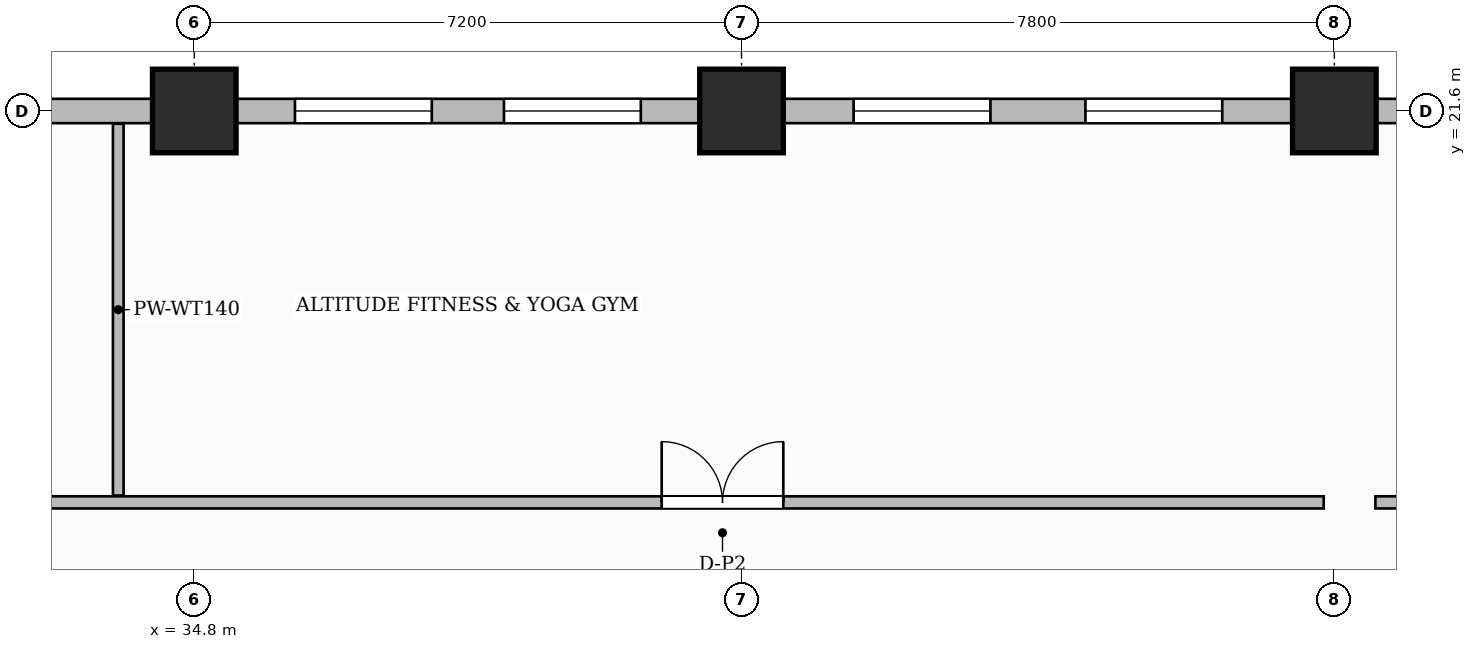
"""IFC4 building model, lengths in metres.
Left out: names, types, materials, properties, quantities, classifications, styles, units other than length and angle.
Written with IfcOpenShell. Run it as: python <this file> out.ifc"""

import sys

from ifc_helpers import new_model, si_unit, direction, frame, frame_2d, origin, origin_2d, place, context, subcontext, project, spatial, rectangle, extrude, source, transform, mapped, element, fill, save


model = new_model("IFC4")
c1 = context("Model", 3, precision=1e-05, world=origin(), true_north=direction((0.0, 1.0)))
c2 = subcontext(c1, "Body", "Model", "MODEL_VIEW")
j1 = project(units=[si_unit("LENGTHUNIT", "METRE"), si_unit("PLANEANGLEUNIT", "RADIAN")], contexts=[c1])
p1 = place(None, origin())
s1 = spatial("IfcSite", under=j1, at=p1, CompositionType="ELEMENT")
p2 = place(p1, origin())
s2 = spatial("IfcBuilding", under=s1, at=p2, CompositionType="ELEMENT")
p3 = place(p2, frame((0.0, 0.0, 62.0)))
s3 = spatial("IfcBuildingStorey", under=s2, at=p3, CompositionType="ELEMENT", Elevation=62.0)
m1 = source(origin(), c2, "Body", "SweptSolid", [
    extrude(rectangle(XDim=1.1, YDim=1.1, at=origin_2d()), origin(), (0.0, 0.0, 1.0), 3.7),
])
for number, where, z_axis, x_axis in (
    (1, (34.8, 21.6, 0.0), (0.0, 0.0, 1.0), (1.0, 0.0, 0.0)),
    (2, (42.0, 21.6, 0.0), (0.0, 0.0, 1.0), (1.0, 0.0, 0.0)),
    (3, (49.8, 21.6, 0.0), (0.0, 0.0, 1.0), (1.0, 0.0, 0.0)),
):
    element("IfcColumn", number, at=place(p3, frame(where, z_axis=z_axis, x_axis=x_axis)), inside=s3, PredefinedType="COLUMN", context=c2, shape_type="MappedRepresentation", body=[
        mapped(m1, transform((0.0, 0.0, 0.0), scale=1.0)),
    ])
p4 = place(p3, frame((30.29, 16.45, 0.0), z_axis=(0.0, 0.0, 1.0), x_axis=(1.0, 0.0, 0.0)))
e4 = element("IfcWall", 4, at=p4, inside=s3, PredefinedType="PARTITIONING", context=c2, shape_type="SweptSolid", body=[
    extrude(rectangle(XDim=19.37, YDim=0.16, at=frame_2d((9.685, 0.0))), origin(), (0.0, 0.0, 1.0), 3.45),
])
p5 = place(p4, frame((1.285, 0.0, 0.0)))
e5 = element("IfcOpeningElement", 5, at=p5, cuts=e4, PredefinedType="OPENING", context=c2, shape_type="SweptSolid", body=[
    extrude(rectangle(XDim=0.85, YDim=2.1, at=frame_2d((0.425, 1.05))), frame((0.0, 0.09, 0.0), z_axis=(0.0, -1.0, 0.0), x_axis=(1.0, 0.0, 0.0)), (0.0, 0.0, 1.0), 0.18),
])
p6 = place(p4, frame((10.66, 0.0, 0.0)))
e6 = element("IfcOpeningElement", 6, at=p6, cuts=e4, PredefinedType="OPENING", context=c2, shape_type="SweptSolid", body=[
    extrude(rectangle(XDim=1.6, YDim=2.4, at=frame_2d((0.8, 1.2))), frame((0.0, 0.09, 0.0), z_axis=(0.0, -1.0, 0.0), x_axis=(1.0, 0.0, 0.0)), (0.0, 0.0, 1.0), 0.18),
])
p7 = place(p3, frame((50.34, 16.45, 0.0), z_axis=(0.0, 0.0, 1.0), x_axis=(1.0, 0.0, 0.0)))
e7 = element("IfcWall", 7, at=p7, inside=s3, PredefinedType="PARTITIONING", context=c2, shape_type="SweptSolid", body=[
    extrude(rectangle(XDim=7.092, YDim=0.16, at=frame_2d((3.546, 0.0))), origin(), (0.0, 0.0, 1.0), 3.45),
])
p8 = place(p7, frame((2.985, 0.0, 0.0)))
e8 = element("IfcOpeningElement", 8, at=p8, cuts=e7, PredefinedType="OPENING", context=c2, shape_type="SweptSolid", body=[
    extrude(rectangle(XDim=0.95, YDim=2.15, at=frame_2d((0.475, 1.075))), frame((0.0, 0.09, 0.0), z_axis=(0.0, -1.0, 0.0), x_axis=(1.0, 0.0, 0.0)), (0.0, 0.0, 1.0), 0.18),
])
p9 = place(p3, frame((33.8, 16.54, 0.0), z_axis=(0.0, 0.0, 1.0), x_axis=(0.0, 1.0, 0.0)))
e9 = element("IfcWall", 9, at=p9, inside=s3, PredefinedType="PARTITIONING", context=c2, shape_type="SweptSolid", body=[
    extrude(rectangle(XDim=4.892, YDim=0.14, at=frame_2d((2.446, 0.0))), origin(), (0.0, 0.0, 1.0), 3.45),
])
p10 = place(p3, frame((14.4, 21.6, 0.0), z_axis=(0.0, 0.0, 1.0), x_axis=(1.0, 0.0, 0.0)))
e10 = element("IfcWall", 10, at=p10, inside=s3, PredefinedType="SOLIDWALL", context=c2, shape_type="SweptSolid", body=[
    extrude(rectangle(XDim=43.2, YDim=0.32, at=frame_2d((21.6, 0.0))), origin(), (0.0, 0.0, 1.0), 2.885),
])
p11 = place(p10, frame((1.5, 0.0, 0.0)))
e11 = element("IfcOpeningElement", 11, at=p11, cuts=e10, PredefinedType="OPENING", context=c2, shape_type="SweptSolid", body=[
    extrude(rectangle(XDim=1.2, YDim=2.2, at=frame_2d((0.6, 1.1))), frame((0.0, 0.17, 0.0), z_axis=(0.0, -1.0, 0.0), x_axis=(1.0, 0.0, 0.0)), (0.0, 0.0, 1.0), 0.34),
])
p12 = place(p10, frame((3.8, 0.0, 0.8)))
e12 = element("IfcOpeningElement", 12, at=p12, cuts=e10, PredefinedType="OPENING", context=c2, shape_type="SweptSolid", body=[
    extrude(rectangle(XDim=1.8, YDim=1.85, at=frame_2d((0.9, 0.925))), frame((0.0, 0.17, 0.0), z_axis=(0.0, -1.0, 0.0), x_axis=(1.0, 0.0, 0.0)), (0.0, 0.0, 1.0), 0.34),
])
p13 = place(p10, frame((8.246, 0.0, 0.8)))
e13 = element("IfcOpeningElement", 13, at=p13, cuts=e10, PredefinedType="OPENING", context=c2, shape_type="SweptSolid", body=[
    extrude(rectangle(XDim=0.95, YDim=1.75, at=frame_2d((0.475, 0.875))), frame((0.0, 0.17, 0.0), z_axis=(0.0, -1.0, 0.0), x_axis=(1.0, 0.0, 0.0)), (0.0, 0.0, 1.0), 0.34),
])
p14 = place(p10, frame((10.629, 0.0, 0.8)))
e14 = element("IfcOpeningElement", 14, at=p14, cuts=e10, PredefinedType="OPENING", context=c2, shape_type="SweptSolid", body=[
    extrude(rectangle(XDim=1.8, YDim=1.85, at=frame_2d((0.9, 0.925))), frame((0.0, 0.17, 0.0), z_axis=(0.0, -1.0, 0.0), x_axis=(1.0, 0.0, 0.0)), (0.0, 0.0, 1.0), 0.34),
])
p15 = place(p10, frame((16.701, 0.0, 0.8)))
e15 = element("IfcOpeningElement", 15, at=p15, cuts=e10, PredefinedType="OPENING", context=c2, shape_type="SweptSolid", body=[
    extrude(rectangle(XDim=1.8, YDim=1.85, at=frame_2d((0.9, 0.925))), frame((0.0, 0.17, 0.0), z_axis=(0.0, -1.0, 0.0), x_axis=(1.0, 0.0, 0.0)), (0.0, 0.0, 1.0), 0.34),
])
p16 = place(p10, frame((21.725, 0.0, 0.8)))
e16 = element("IfcOpeningElement", 16, at=p16, cuts=e10, PredefinedType="OPENING", context=c2, shape_type="SweptSolid", body=[
    extrude(rectangle(XDim=1.8, YDim=1.85, at=frame_2d((0.9, 0.925))), frame((0.0, 0.17, 0.0), z_axis=(0.0, -1.0, 0.0), x_axis=(1.0, 0.0, 0.0)), (0.0, 0.0, 1.0), 0.34),
])
p17 = place(p10, frame((24.475, 0.0, 0.8)))
e17 = element("IfcOpeningElement", 17, at=p17, cuts=e10, PredefinedType="OPENING", context=c2, shape_type="SweptSolid", body=[
    extrude(rectangle(XDim=1.8, YDim=1.85, at=frame_2d((0.9, 0.925))), frame((0.0, 0.17, 0.0), z_axis=(0.0, -1.0, 0.0), x_axis=(1.0, 0.0, 0.0)), (0.0, 0.0, 1.0), 0.34),
])
p18 = place(p10, frame((29.075, 0.0, 0.8)))
e18 = element("IfcOpeningElement", 18, at=p18, cuts=e10, PredefinedType="OPENING", context=c2, shape_type="SweptSolid", body=[
    extrude(rectangle(XDim=1.8, YDim=1.85, at=frame_2d((0.9, 0.925))), frame((0.0, 0.17, 0.0), z_axis=(0.0, -1.0, 0.0), x_axis=(1.0, 0.0, 0.0)), (0.0, 0.0, 1.0), 0.34),
])
p19 = place(p10, frame((32.125, 0.0, 0.8)))
e19 = element("IfcOpeningElement", 19, at=p19, cuts=e10, PredefinedType="OPENING", context=c2, shape_type="SweptSolid", body=[
    extrude(rectangle(XDim=1.8, YDim=1.85, at=frame_2d((0.9, 0.925))), frame((0.0, 0.17, 0.0), z_axis=(0.0, -1.0, 0.0), x_axis=(1.0, 0.0, 0.0)), (0.0, 0.0, 1.0), 0.34),
])
p20 = place(p10, frame((36.875, 0.0, 0.8)))
e20 = element("IfcOpeningElement", 20, at=p20, cuts=e10, PredefinedType="OPENING", context=c2, shape_type="SweptSolid", body=[
    extrude(rectangle(XDim=1.8, YDim=1.85, at=frame_2d((0.9, 0.925))), frame((0.0, 0.17, 0.0), z_axis=(0.0, -1.0, 0.0), x_axis=(1.0, 0.0, 0.0)), (0.0, 0.0, 1.0), 0.34),
])
p21 = place(p10, frame((39.925, 0.0, 0.8)))
e21 = element("IfcOpeningElement", 21, at=p21, cuts=e10, PredefinedType="OPENING", context=c2, shape_type="SweptSolid", body=[
    extrude(rectangle(XDim=1.8, YDim=1.85, at=frame_2d((0.9, 0.925))), frame((0.0, 0.17, 0.0), z_axis=(0.0, -1.0, 0.0), x_axis=(1.0, 0.0, 0.0)), (0.0, 0.0, 1.0), 0.34),
])
m2 = source(origin(), c2, "Body", "SweptSolid", [
    extrude(rectangle(XDim=1.6, YDim=2.4, at=frame_2d((0.8, 1.2))), frame((0.0, 0.025, 0.0), z_axis=(0.0, -1.0, 0.0), x_axis=(1.0, 0.0, 0.0)), (0.0, 0.0, 1.0), 0.05),
])
p22 = place(p6, origin())
e22 = element("IfcDoor", 22, at=p22, inside=s3, OperationType="DOUBLE_DOOR_SINGLE_SWING", PredefinedType="DOOR", context=c2, shape_type="MappedRepresentation", body=[
    mapped(m2, transform((0.0, 0.0, 0.0), scale=1.0)),
])
fill(e6, e22)
m3 = source(origin(), c2, "Body", "SweptSolid", [
    extrude(rectangle(XDim=1.8, YDim=1.85, at=frame_2d((0.9, 0.925))), frame((0.0, 0.03, 0.0), z_axis=(0.0, -1.0, 0.0), x_axis=(1.0, 0.0, 0.0)), (0.0, 0.0, 1.0), 0.06),
])
p23 = place(p16, origin())
e23 = element("IfcWindow", 23, at=p23, inside=s3, PartitioningType="DOUBLE_PANEL_VERTICAL", PredefinedType="WINDOW", context=c2, shape_type="MappedRepresentation", body=[
    mapped(m3, transform((0.0, 0.0, 0.0), scale=1.0)),
])
fill(e16, e23)
p24 = place(p17, origin())
e24 = element("IfcWindow", 24, at=p24, inside=s3, PartitioningType="DOUBLE_PANEL_VERTICAL", PredefinedType="WINDOW", context=c2, shape_type="MappedRepresentation", body=[
    mapped(m3, transform((0.0, 0.0, 0.0), scale=1.0)),
])
fill(e17, e24)
p25 = place(p18, origin())
e25 = element("IfcWindow", 25, at=p25, inside=s3, PartitioningType="DOUBLE_PANEL_VERTICAL", PredefinedType="WINDOW", context=c2, shape_type="MappedRepresentation", body=[
    mapped(m3, transform((0.0, 0.0, 0.0), scale=1.0)),
])
fill(e18, e25)
p26 = place(p19, origin())
e26 = element("IfcWindow", 26, at=p26, inside=s3, PartitioningType="DOUBLE_PANEL_VERTICAL", PredefinedType="WINDOW", context=c2, shape_type="MappedRepresentation", body=[
    mapped(m3, transform((0.0, 0.0, 0.0), scale=1.0)),
])
fill(e19, e26)
save(model, sys.argv[1])
